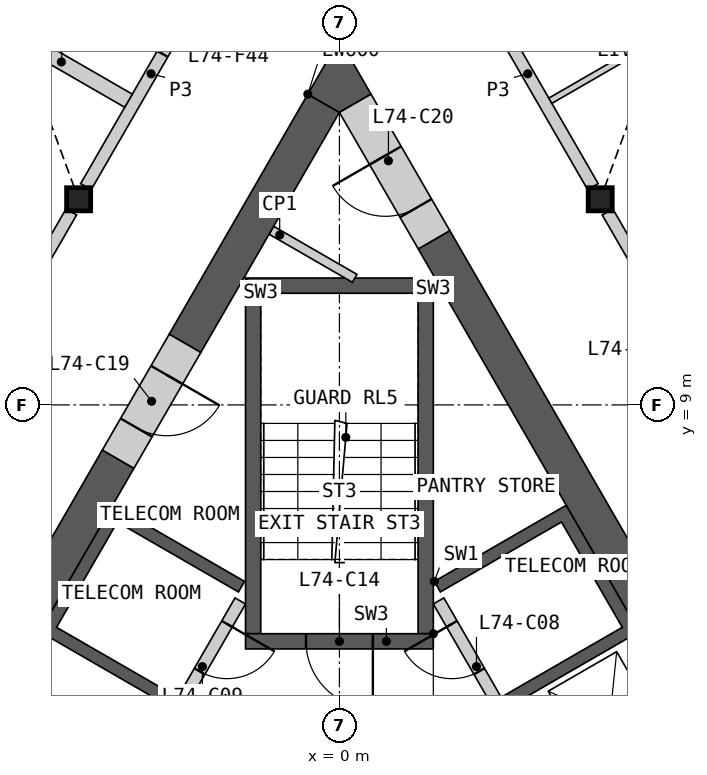
"""IFC4 building model, lengths in metres.
Left out: names, types, materials, properties, quantities, classifications, styles, units other than length and angle.
Written with IfcOpenShell. Run it as: python <this file> out.ifc"""

import sys

from ifc_helpers import new_model, si_unit, direction, frame, frame_2d, origin, origin_2d, place, context, subcontext, project, spatial, polyline, rectangle, i_section, outline, extrude, element, fill, save


model = new_model("IFC4")
c1 = context("Model", 3, precision=1e-05, world=origin(), true_north=direction((0.0, 1.0)))
c2 = subcontext(c1, "Body", "Model", "MODEL_VIEW")
j1 = project(units=[si_unit("LENGTHUNIT", "METRE"), si_unit("PLANEANGLEUNIT", "RADIAN")], contexts=[c1])
p1 = place(None, origin())
s1 = spatial("IfcSite", under=j1, at=p1, CompositionType="ELEMENT")
p2 = place(p1, origin())
s2 = spatial("IfcBuilding", under=s1, at=p2, CompositionType="ELEMENT")
p3 = place(p2, frame((0.0, 0.0, 332.4)))
s3 = spatial("IfcBuildingStorey", under=s2, at=p3, CompositionType="ELEMENT", Elevation=332.4)
for number, where, z_axis, x_axis in (
    (1, (-4.289, 12.382, 0.0), (0.0, 0.0, 1.0), (1.0, 0.0, 0.0)),
    (2, (4.289, 12.382, 0.0), (0.0, 0.0, 1.0), (1.0, 0.0, 0.0)),
):
    element("IfcColumn", number, at=place(p3, frame(where, z_axis=z_axis, x_axis=x_axis)), inside=s3, PredefinedType="COLUMN", context=c2, shape_type="SweptSolid", body=[
        extrude(i_section(OverallWidth=0.396, OverallDepth=0.381, WebThickness=0.019, FlangeThickness=0.03, at=origin_2d()), origin(), (0.0, 0.0, 1.0), 3.4),
    ])
p4 = place(p3, origin())
e3 = element("IfcWall", 3, at=p4, inside=s3, PredefinedType="SHEAR", context=c2, shape_type="SweptSolid", body=[
    extrude(outline(polyline([(1.561, 6.097), (3.731, 7.35), (8.231, -0.444), (6.061, -1.697), (5.96, -1.524), (7.952, -0.374), (6.952, 1.358), (4.96, 0.208), (4.861, 0.381), (6.852, 1.531), (5.852, 3.263), (3.861, 2.113), (3.76, 2.287), (5.752, 3.437), (4.752, 5.169), (2.76, 4.019), (2.66, 4.192), (4.652, 5.342), (3.652, 7.074), (1.66, 5.924), (1.561, 6.097)])), origin(), (0.0, 0.0, 1.0), 3.1),
])
p5 = place(p3, frame((5.817, -1.476, 0.0), z_axis=(0.0, 0.0, 1.0), x_axis=(-0.500002616675, 0.866023893041, 0.0)))
e4 = element("IfcWall", 4, at=p5, inside=s3, PredefinedType="SOLIDWALL", context=c2, shape_type="SweptSolid", body=[
    extrude(rectangle(XDim=8.373, YDim=0.2, at=frame_2d((4.187, 0.0))), origin(), (0.0, 0.0, 1.0), 3.1),
])
p6 = place(p5, frame((0.337, 0.0, 0.0)))
e5 = element("IfcOpeningElement", 5, at=p6, cuts=e4, PredefinedType="OPENING", context=c2, shape_type="SweptSolid", body=[
    extrude(rectangle(XDim=1.1, YDim=2.1, at=frame_2d((0.55, 1.05))), frame((0.0, 0.11, 0.0), z_axis=(0.0, -1.0, 0.0), x_axis=(1.0, 0.0, 0.0)), (0.0, 0.0, 1.0), 0.22),
])
p7 = place(p5, frame((2.537, 0.0, 0.0)))
e6 = element("IfcOpeningElement", 6, at=p7, cuts=e4, PredefinedType="OPENING", context=c2, shape_type="SweptSolid", body=[
    extrude(rectangle(XDim=1.1, YDim=2.1, at=frame_2d((0.55, 1.05))), frame((0.0, 0.11, 0.0), z_axis=(0.0, -1.0, 0.0), x_axis=(1.0, 0.0, 0.0)), (0.0, 0.0, 1.0), 0.22),
])
p8 = place(p5, frame((4.737, 0.0, 0.0)))
e7 = element("IfcOpeningElement", 7, at=p8, cuts=e4, PredefinedType="OPENING", context=c2, shape_type="SweptSolid", body=[
    extrude(rectangle(XDim=1.1, YDim=2.1, at=frame_2d((0.55, 1.05))), frame((0.0, 0.11, 0.0), z_axis=(0.0, -1.0, 0.0), x_axis=(1.0, 0.0, 0.0)), (0.0, 0.0, 1.0), 0.22),
])
p9 = place(p5, frame((7.037, 0.0, 0.0)))
e8 = element("IfcOpeningElement", 8, at=p9, cuts=e4, PredefinedType="OPENING", context=c2, shape_type="SweptSolid", body=[
    extrude(rectangle(XDim=0.9, YDim=2.1, at=frame_2d((0.45, 1.05))), frame((0.0, 0.11, 0.0), z_axis=(0.0, -1.0, 0.0), x_axis=(1.0, 0.0, 0.0)), (0.0, 0.0, 1.0), 0.22),
])
p10 = place(p3, origin())
e9 = element("IfcWall", 9, at=p10, inside=s3, PredefinedType="SHEAR", context=c2, shape_type="SweptSolid", body=[
    extrude(outline(polyline([(-4.96, 0.208), (-7.131, 1.461), (-3.731, 7.35), (-1.561, 6.097), (-1.66, 5.924), (-3.652, 7.074), (-4.652, 5.342), (-2.66, 4.192), (-2.76, 4.019), (-4.752, 5.169), (-6.852, 1.531), (-4.861, 0.381), (-4.96, 0.208)])), origin(), (0.0, 0.0, 1.0), 3.1),
])
p11 = place(p3, frame((-1.631, 5.776, 0.0), z_axis=(0.0, 0.0, 1.0), x_axis=(-0.499992876559, -0.866029516466, 0.0)))
e10 = element("IfcWall", 10, at=p11, inside=s3, PredefinedType="SOLIDWALL", context=c2, shape_type="SweptSolid", body=[
    extrude(rectangle(XDim=6.486, YDim=0.2, at=frame_2d((3.243, 0.0))), origin(), (0.0, 0.0, 1.0), 3.1),
])
p12 = place(p11, frame((0.437, 0.0, 0.0)))
e11 = element("IfcOpeningElement", 11, at=p12, cuts=e10, PredefinedType="OPENING", context=c2, shape_type="SweptSolid", body=[
    extrude(rectangle(XDim=0.9, YDim=2.1, at=frame_2d((0.45, 1.05))), frame((0.0, 0.11, 0.0), z_axis=(0.0, -1.0, 0.0), x_axis=(1.0, 0.0, 0.0)), (0.0, 0.0, 1.0), 0.22),
])
p13 = place(p11, frame((3.737, 0.0, 0.0)))
e12 = element("IfcOpeningElement", 12, at=p13, cuts=e10, PredefinedType="OPENING", context=c2, shape_type="SweptSolid", body=[
    extrude(rectangle(XDim=0.9, YDim=2.1, at=frame_2d((0.45, 1.05))), frame((0.0, 0.11, 0.0), z_axis=(0.0, -1.0, 0.0), x_axis=(1.0, 0.0, 0.0)), (0.0, 0.0, 1.0), 0.22),
])
p14 = place(p3, origin())
e13 = element("IfcWall", 13, at=p14, inside=s3, PredefinedType="SHEAR", context=c2, shape_type="SweptSolid", body=[
    extrude(outline(polyline([(1.544, 5.237), (1.544, 11.087), (1.294, 10.837), (1.294, 5.237), (1.544, 5.237)])), origin(), (0.0, 0.0, 1.0), 3.1),
])
p15 = place(p3, origin())
e14 = element("IfcWall", 14, at=p15, inside=s3, PredefinedType="SHEAR", context=c2, shape_type="SweptSolid", body=[
    extrude(outline(polyline([(1.544, 11.087), (-1.544, 11.087), (-1.294, 10.837), (1.294, 10.837), (1.544, 11.087)])), origin(), (0.0, 0.0, 1.0), 3.1),
])
p16 = place(p3, origin())
e15 = element("IfcWall", 15, at=p16, inside=s3, PredefinedType="SHEAR", context=c2, shape_type="SweptSolid", body=[
    extrude(outline(polyline([(-1.294, 10.837), (-1.544, 11.087), (-1.544, 5.237), (-1.294, 5.237), (-1.294, 10.837)])), origin(), (0.0, 0.0, 1.0), 3.1),
])
p17 = place(p3, frame((1.544, 5.112, 0.0), z_axis=(0.0, 0.0, 1.0), x_axis=(-1.0, 0.0, 0.0)))
e16 = element("IfcWall", 16, at=p17, inside=s3, PredefinedType="SHEAR", context=c2, shape_type="SweptSolid", body=[
    extrude(rectangle(XDim=3.088, YDim=0.25, at=frame_2d((1.544, 0.0))), origin(), (0.0, 0.0, 1.0), 3.1),
])
p18 = place(p17, frame((0.994, 0.0, 0.0)))
e17 = element("IfcOpeningElement", 17, at=p18, cuts=e16, PredefinedType="OPENING", context=c2, shape_type="SweptSolid", body=[
    extrude(rectangle(XDim=1.1, YDim=2.1, at=frame_2d((0.55, 1.05))), frame((0.0, 0.135, 0.0), z_axis=(0.0, -1.0, 0.0), x_axis=(1.0, 0.0, 0.0)), (0.0, 0.0, 1.0), 0.27),
])
p19 = place(p3, frame((-1.119, 11.873, 0.0), z_axis=(0.0, 0.0, 1.0), x_axis=(0.865992812752, -0.500056445075, 0.0)))
e18 = element("IfcWall", 18, at=p19, inside=s3, PredefinedType="PARTITIONING", context=c2, shape_type="SweptSolid", body=[
    extrude(rectangle(XDim=1.582, YDim=0.15, at=frame_2d((0.791, 0.0))), origin(), (0.0, 0.0, 1.0), 3.1),
])
p20 = place(p3, frame((8.841, -0.902, 0.0), z_axis=(0.0, 0.0, 1.0), x_axis=(-0.499995618375, 0.866027933502, 0.0)))
e19 = element("IfcWall", 19, at=p20, inside=s3, PredefinedType="SHEAR", context=c2, shape_type="SweptSolid", body=[
    extrude(rectangle(XDim=14.571, YDim=0.6, at=frame_2d((7.285, 0.0))), origin(), (0.0, 0.0, 1.0), 3.1),
])
p21 = place(p3, frame((-3.639, 8.107, 0.0), z_axis=(0.0, 0.0, 1.0), x_axis=(-0.49999180351, -0.866030135978, 0.0)))
e20 = element("IfcWall", 20, at=p21, inside=s3, PredefinedType="SHEAR", context=c2, shape_type="SweptSolid", body=[
    extrude(rectangle(XDim=7.401, YDim=0.6, at=frame_2d((3.701, 0.0))), origin(), (0.0, 0.0, 1.0), 3.1),
])
p22 = place(p3, frame((-0.26, 13.961, 0.0), z_axis=(0.0, 0.0, 1.0), x_axis=(-0.499980485389, -0.866036670257, 0.0)))
e21 = element("IfcWall", 21, at=p22, inside=s3, PredefinedType="SHEAR", context=c2, shape_type="SweptSolid", body=[
    extrude(rectangle(XDim=4.559, YDim=0.6, at=frame_2d((2.28, 0.0))), origin(), (0.0, 0.0, 1.0), 3.1),
])
p23 = place(p3, origin())
e22 = element("IfcWall", 22, at=p23, inside=s3, PredefinedType="SHEAR", context=c2, shape_type="SweptSolid", body=[
    extrude(outline(polyline([(-0.52, 14.111), (0.0, 15.011), (0.52, 14.111), (0.0, 13.811), (-0.52, 14.111)])), origin(), (0.0, 0.0, 1.0), 3.1),
])
p24 = place(p3, frame((-2.539, 10.013, 0.0), z_axis=(0.0, 0.0, 1.0), x_axis=(-0.50002983664, -0.866008176907, 0.0)))
e23 = element("IfcWall", 23, at=p24, inside=s3, PredefinedType="SHEAR", context=c2, shape_type="SweptSolid", body=[
    extrude(rectangle(XDim=2.2, YDim=0.6, at=frame_2d((1.1, 0.0))), origin(), (0.0, 0.0, 1.0), 3.1),
])
p25 = place(p24, frame((0.6, 0.0, 0.0)))
e24 = element("IfcOpeningElement", 24, at=p25, cuts=e23, PredefinedType="OPENING", context=c2, shape_type="SweptSolid", body=[
    extrude(rectangle(XDim=1.0, YDim=2.1, at=frame_2d((0.5, 1.05))), frame((0.0, 0.31, 0.0), z_axis=(0.0, -1.0, 0.0), x_axis=(1.0, 0.0, 0.0)), (0.0, 0.0, 1.0), 0.62),
])
p26 = place(p3, frame((1.556, 11.716, 0.0), z_axis=(0.0, 0.0, 1.0), x_axis=(-0.500018667571, 0.866014625789, 0.0)))
e25 = element("IfcWall", 25, at=p26, inside=s3, PredefinedType="SHEAR", context=c2, shape_type="SweptSolid", body=[
    extrude(rectangle(XDim=2.592, YDim=0.6, at=frame_2d((1.296, 0.0))), origin(), (0.0, 0.0, 1.0), 3.1),
])
p27 = place(p26, frame((0.6, 0.0, 0.0)))
e26 = element("IfcOpeningElement", 26, at=p27, cuts=e25, PredefinedType="OPENING", context=c2, shape_type="SweptSolid", body=[
    extrude(rectangle(XDim=1.0, YDim=2.1, at=frame_2d((0.5, 1.05))), frame((0.0, 0.31, 0.0), z_axis=(0.0, -1.0, 0.0), x_axis=(1.0, 0.0, 0.0)), (0.0, 0.0, 1.0), 0.62),
])
p28 = place(p3, frame((4.409, 12.174, 0.0), z_axis=(0.0, 0.0, 1.0), x_axis=(0.499984266882, -0.866034487114, 0.0)))
e27 = element("IfcWall", 27, at=p28, inside=s3, PredefinedType="PARTITIONING", context=c2, shape_type="SweptSolid", body=[
    extrude(rectangle(XDim=8.099, YDim=0.2, at=frame_2d((4.049, 0.0))), origin(), (0.0, 0.0, 1.0), 3.1),
])
p29 = place(p28, frame((1.164, 0.0, 0.0)))
e28 = element("IfcOpeningElement", 28, at=p29, cuts=e27, PredefinedType="OPENING", context=c2, shape_type="SweptSolid", body=[
    extrude(rectangle(XDim=1.0, YDim=2.1, at=frame_2d((0.5, 1.05))), frame((0.0, 0.11, 0.0), z_axis=(0.0, -1.0, 0.0), x_axis=(1.0, 0.0, 0.0)), (0.0, 0.0, 1.0), 0.22),
])
p30 = place(p3, frame((-8.458, 5.16, 0.0), z_axis=(0.0, 0.0, 1.0), x_axis=(0.499984266882, 0.866034487114, 0.0)))
e29 = element("IfcWall", 29, at=p30, inside=s3, PredefinedType="PARTITIONING", context=c2, shape_type="SweptSolid", body=[
    extrude(rectangle(XDim=8.099, YDim=0.2, at=frame_2d((4.049, 0.0))), origin(), (0.0, 0.0, 1.0), 3.1),
])
p31 = place(p30, frame((1.976, 0.0, 0.0)))
e30 = element("IfcOpeningElement", 30, at=p31, cuts=e29, PredefinedType="OPENING", context=c2, shape_type="SweptSolid", body=[
    extrude(rectangle(XDim=1.0, YDim=2.1, at=frame_2d((0.5, 1.05))), frame((0.0, 0.11, 0.0), z_axis=(0.0, -1.0, 0.0), x_axis=(1.0, 0.0, 0.0)), (0.0, 0.0, 1.0), 0.22),
])
p32 = place(p3, frame((2.025, 16.303, 0.0), z_axis=(0.0, 0.0, 1.0), x_axis=(0.499978750566, -0.866037671803, 0.0)))
e31 = element("IfcWall", 31, at=p32, inside=s3, PredefinedType="PARTITIONING", context=c2, shape_type="SweptSolid", body=[
    extrude(rectangle(XDim=4.288, YDim=0.2, at=frame_2d((2.144, 0.0))), origin(), (0.0, 0.0, 1.0), 3.1),
])
p33 = place(p3, frame((-4.169, 12.59, 0.0), z_axis=(0.0, 0.0, 1.0), x_axis=(0.499978750566, 0.866037671803, 0.0)))
e32 = element("IfcWall", 32, at=p33, inside=s3, PredefinedType="PARTITIONING", context=c2, shape_type="SweptSolid", body=[
    extrude(rectangle(XDim=4.288, YDim=0.2, at=frame_2d((2.144, 0.0))), origin(), (0.0, 0.0, 1.0), 3.1),
])
p34 = place(p33, frame((2.521, 0.0, 0.0)))
e33 = element("IfcOpeningElement", 33, at=p34, cuts=e32, PredefinedType="OPENING", context=c2, shape_type="SweptSolid", body=[
    extrude(rectangle(XDim=1.0, YDim=2.1, at=frame_2d((0.5, 1.05))), frame((0.0, 0.11, 0.0), z_axis=(0.0, -1.0, 0.0), x_axis=(1.0, 0.0, 0.0)), (0.0, 0.0, 1.0), 0.22),
])
p35 = place(p3, frame((-5.677, 15.278, 0.0), z_axis=(0.0, 0.0, 1.0), x_axis=(0.866013403995, -0.500020783669, 0.0)))
e34 = element("IfcWall", 34, at=p35, inside=s3, PredefinedType="PARTITIONING", context=c2, shape_type="SweptSolid", body=[
    extrude(rectangle(XDim=2.55, YDim=0.25, at=frame_2d((1.275, 0.0))), origin(), (0.0, 0.0, 1.0), 2.33),
])
p36 = place(p3, frame((3.469, 14.003, 0.0), z_axis=(0.0, 0.0, 1.0), x_axis=(0.866021563384, 0.50000665171, 0.0)))
e35 = element("IfcWall", 35, at=p36, inside=s3, PredefinedType="PARTITIONING", context=c2, shape_type="SweptSolid", body=[
    extrude(rectangle(XDim=12.641, YDim=0.1, at=frame_2d((6.321, 0.0))), origin(), (0.0, 0.0, 1.0), 2.33),
])
p37 = place(p36, frame((8.215, 0.0, 0.0)))
e36 = element("IfcOpeningElement", 36, at=p37, cuts=e35, PredefinedType="OPENING", context=c2, shape_type="SweptSolid", body=[
    extrude(rectangle(XDim=0.95, YDim=2.1, at=frame_2d((0.475, 1.05))), frame((0.0, 0.06, 0.0), z_axis=(0.0, -1.0, 0.0), x_axis=(1.0, 0.0, 0.0)), (0.0, 0.0, 1.0), 0.12),
])
p38 = place(p3, frame((-7.095, 12.921, 0.0), z_axis=(0.0, 0.0, 1.0), x_axis=(0.499996545922, 0.866027397988, 0.0)))
e37 = element("IfcWall", 37, at=p38, inside=s3, PredefinedType="PARTITIONING", context=c2, shape_type="SweptSolid", body=[
    extrude(rectangle(XDim=5.5, YDim=0.1, at=frame_2d((2.75, 0.0))), origin(), (0.0, 0.0, 1.0), 2.33),
])
p39 = place(p9, origin())
e38 = element("IfcDoor", 38, at=p39, inside=s3, OperationType="SINGLE_SWING_RIGHT", PredefinedType="DOOR", context=c2, shape_type="SweptSolid", body=[
    extrude(rectangle(XDim=0.9, YDim=2.1, at=frame_2d((0.45, 1.05))), frame((0.0, 0.025, 0.0), z_axis=(0.0, -1.0, 0.0), x_axis=(1.0, 0.0, 0.0)), (0.0, 0.0, 1.0), 0.05),
])
fill(e8, e38)
p40 = place(p12, origin())
e39 = element("IfcDoor", 39, at=p40, inside=s3, OperationType="SINGLE_SWING_LEFT", PredefinedType="DOOR", context=c2, shape_type="SweptSolid", body=[
    extrude(rectangle(XDim=0.9, YDim=2.1, at=frame_2d((0.45, 1.05))), frame((0.0, 0.025, 0.0), z_axis=(0.0, -1.0, 0.0), x_axis=(1.0, 0.0, 0.0)), (0.0, 0.0, 1.0), 0.05),
])
fill(e11, e39)
p41 = place(p18, origin())
e40 = element("IfcDoor", 40, at=p41, inside=s3, OperationType="SINGLE_SWING_LEFT", PredefinedType="DOOR", context=c2, shape_type="SweptSolid", body=[
    extrude(rectangle(XDim=1.1, YDim=2.1, at=frame_2d((0.55, 1.05))), frame((0.0, 0.025, 0.0), z_axis=(0.0, -1.0, 0.0), x_axis=(1.0, 0.0, 0.0)), (0.0, 0.0, 1.0), 0.05),
])
fill(e17, e40)
p42 = place(p25, origin())
e41 = element("IfcDoor", 41, at=p42, inside=s3, OperationType="SINGLE_SWING_LEFT", PredefinedType="DOOR", context=c2, shape_type="SweptSolid", body=[
    extrude(rectangle(XDim=1.0, YDim=2.1, at=frame_2d((0.5, 1.05))), frame((0.0, 0.055, 0.0), z_axis=(0.0, -1.0, 0.0), x_axis=(1.0, 0.0, 0.0)), (0.0, 0.0, 1.0), 0.05),
])
fill(e24, e41)
p43 = place(p27, origin())
e42 = element("IfcDoor", 42, at=p43, inside=s3, OperationType="SINGLE_SWING_RIGHT", PredefinedType="DOOR", context=c2, shape_type="SweptSolid", body=[
    extrude(rectangle(XDim=1.0, YDim=2.1, at=frame_2d((0.5, 1.05))), frame((0.0, 0.055, 0.0), z_axis=(0.0, -1.0, 0.0), x_axis=(1.0, 0.0, 0.0)), (0.0, 0.0, 1.0), 0.05),
])
fill(e26, e42)
p44 = place(p34, origin())
e43 = element("IfcDoor", 43, at=p44, inside=s3, OperationType="SINGLE_SWING_LEFT", PredefinedType="DOOR", context=c2, shape_type="SweptSolid", body=[
    extrude(rectangle(XDim=1.0, YDim=2.1, at=frame_2d((0.5, 1.05))), frame((0.0, 0.025, 0.0), z_axis=(0.0, -1.0, 0.0), x_axis=(1.0, 0.0, 0.0)), (0.0, 0.0, 1.0), 0.05),
])
fill(e33, e43)
save(model, sys.argv[1])
